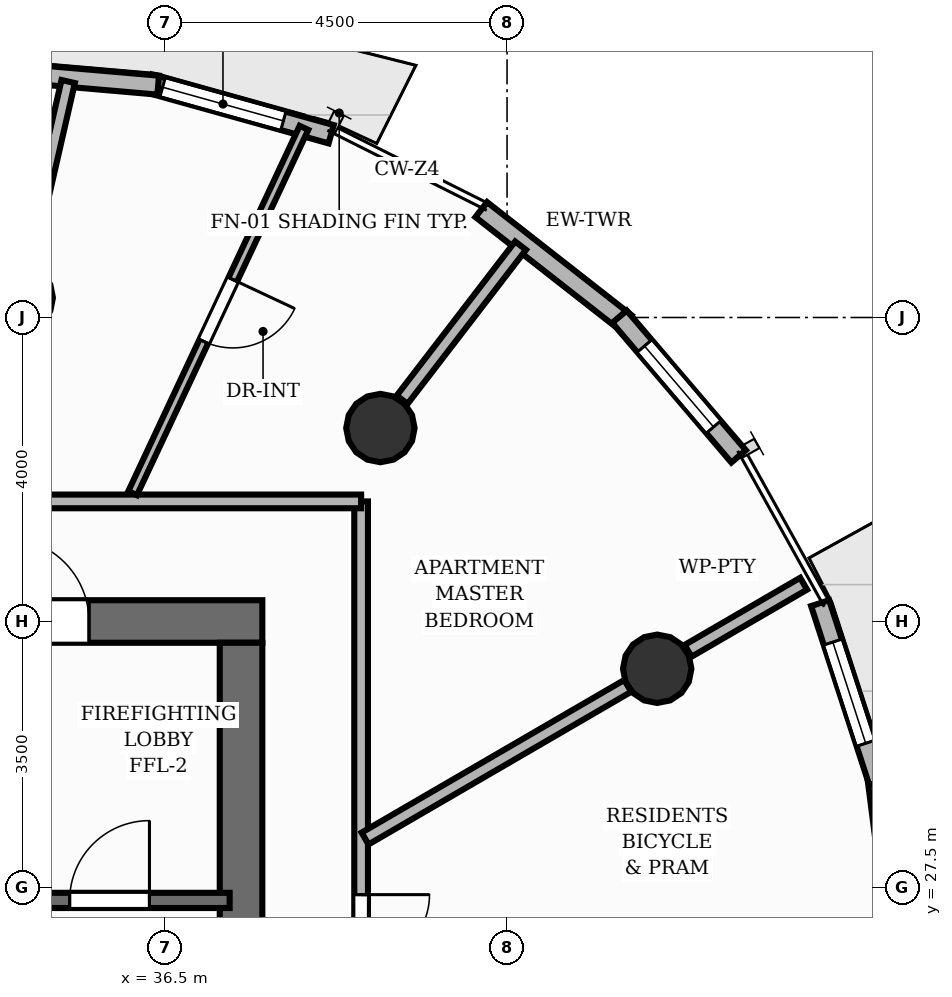
"""IFC4 building model, lengths in metres.
Left out: names, types, materials, properties, quantities, classifications, styles, units other than length and angle.
Written with IfcOpenShell. Run it as: python <this file> out.ifc"""

import sys

from ifc_helpers import new_model, si_unit, direction, frame, frame_2d, origin, origin_2d, place, context, subcontext, project, spatial, rectangle, circle, extrude, element, fill, save


model = new_model("IFC4")
c1 = context("Model", 3, precision=1e-05, world=origin(), true_north=direction((0.0, 1.0)))
c2 = subcontext(c1, "Body", "Model", "MODEL_VIEW")
j1 = project(units=[si_unit("LENGTHUNIT", "METRE"), si_unit("PLANEANGLEUNIT", "RADIAN")], contexts=[c1])
p1 = place(None, origin())
s1 = spatial("IfcSite", under=j1, at=p1, CompositionType="ELEMENT")
p2 = place(p1, origin())
s2 = spatial("IfcBuilding", under=s1, at=p2, CompositionType="ELEMENT")
p3 = place(p2, frame((0.0, 0.0, 188.64)))
s3 = spatial("IfcBuildingStorey", under=s2, at=p3, CompositionType="ELEMENT", Elevation=188.64)
p4 = place(p3, frame((26.22, 31.0, 0.0), z_axis=(0.0, 0.0, 1.0), x_axis=(1.0, 0.0, 0.0)))
e1 = element("IfcWall", 1, at=p4, inside=s3, PredefinedType="SHEAR", context=c2, shape_type="SweptSolid", body=[
    extrude(rectangle(XDim=11.56, YDim=0.56, at=frame_2d((5.78, 0.0))), origin(), (0.0, 0.0, 1.0), 3.2),
])
p5 = place(p4, frame((8.18, 0.0, 0.0)))
e2 = element("IfcOpeningElement", 2, at=p5, cuts=e1, PredefinedType="OPENING", context=c2, shape_type="SweptSolid", body=[
    extrude(rectangle(XDim=1.1, YDim=2.15, at=frame_2d((0.55, 1.075))), frame((0.0, 0.29, 0.0), z_axis=(0.0, -1.0, 0.0), x_axis=(1.0, 0.0, 0.0)), (0.0, 0.0, 1.0), 0.58),
])
p6 = place(p4, frame((0.805, 0.0, 0.0)))
e3 = element("IfcOpeningElement", 3, at=p6, cuts=e1, PredefinedType="OPENING", context=c2, shape_type="SweptSolid", body=[
    extrude(rectangle(XDim=1.05, YDim=2.15, at=frame_2d((0.525, 1.075))), frame((0.0, 0.29, 0.0), z_axis=(0.0, -1.0, 0.0), x_axis=(1.0, 0.0, 0.0)), (0.0, 0.0, 1.0), 0.58),
])
p7 = place(p4, frame((2.555, 0.0, 0.0)))
e4 = element("IfcOpeningElement", 4, at=p7, cuts=e1, PredefinedType="OPENING", context=c2, shape_type="SweptSolid", body=[
    extrude(rectangle(XDim=1.05, YDim=2.15, at=frame_2d((0.525, 1.075))), frame((0.0, 0.29, 0.0), z_axis=(0.0, -1.0, 0.0), x_axis=(1.0, 0.0, 0.0)), (0.0, 0.0, 1.0), 0.58),
])
p8 = place(p4, frame((4.305, 0.0, 0.0)))
e5 = element("IfcOpeningElement", 5, at=p8, cuts=e1, PredefinedType="OPENING", context=c2, shape_type="SweptSolid", body=[
    extrude(rectangle(XDim=1.05, YDim=2.15, at=frame_2d((0.525, 1.075))), frame((0.0, 0.29, 0.0), z_axis=(0.0, -1.0, 0.0), x_axis=(1.0, 0.0, 0.0)), (0.0, 0.0, 1.0), 0.58),
])
p9 = place(p3, frame((37.5, 17.28, 0.0), z_axis=(0.0, 0.0, 1.0), x_axis=(0.0, 1.0, 0.0)))
e6 = element("IfcWall", 6, at=p9, inside=s3, PredefinedType="SHEAR", context=c2, shape_type="SweptSolid", body=[
    extrude(rectangle(XDim=13.44, YDim=0.56, at=frame_2d((6.72, 0.0))), origin(), (0.0, 0.0, 1.0), 3.2),
])
for number, where, z_axis, x_axis in (
    (7, (42.975, 30.378, 0.0), (0.0, 0.0, 1.0), (1.0, 0.0, 0.0)),
    (8, (39.333, 33.545, 0.0), (0.0, 0.0, 1.0), (1.0, 0.0, 0.0)),
    (9, (34.575, 35.26, 0.0), (0.0, 0.0, 1.0), (1.0, 0.0, 0.0)),
):
    element("IfcColumn", number, at=place(p3, frame(where, z_axis=z_axis, x_axis=x_axis)), inside=s3, PredefinedType="COLUMN", context=c2, shape_type="SweptSolid", body=[
        extrude(circle(Radius=0.45, at=origin_2d()), origin(), (0.0, 0.0, 1.0), 3.2),
    ])
p10 = place(p3, frame((40.661, 36.42, 0.0), z_axis=(0.0, 0.0, 1.0), x_axis=(0.787404715416, -0.616436382883, 0.0)))
e10 = element("IfcWall", 10, at=p10, inside=s3, PredefinedType="SOLIDWALL", context=c2, shape_type="SweptSolid", body=[
    extrude(rectangle(XDim=2.415, YDim=0.25, at=frame_2d((1.208, 0.0))), origin(), (0.0, 0.0, 1.0), 2.96),
])
p11 = place(p3, frame((36.299, 38.077, 0.0), z_axis=(0.0, 0.0, 1.0), x_axis=(0.96316841201, -0.26889888454, 0.0)))
e11 = element("IfcWall", 11, at=p11, inside=s3, PredefinedType="SOLIDWALL", context=c2, shape_type="SweptSolid", body=[
    extrude(rectangle(XDim=2.478, YDim=0.25, at=frame_2d((1.239, 0.0))), origin(), (0.0, 0.0, 1.0), 2.96),
])
p12 = place(p11, frame((0.175, 0.0, 0.85)))
e12 = element("IfcOpeningElement", 12, at=p12, cuts=e11, PredefinedType="OPENING", context=c2, shape_type="SweptSolid", body=[
    extrude(rectangle(XDim=1.65, YDim=1.55, at=frame_2d((0.825, 0.775))), frame((0.0, 0.135, 0.0), z_axis=(0.0, -1.0, 0.0), x_axis=(1.0, 0.0, 0.0)), (0.0, 0.0, 1.0), 0.27),
])
p13 = place(p3, frame((33.888, 38.276, 0.0), z_axis=(0.0, 0.0, 1.0), x_axis=(0.996260822813, -0.08639660252, 0.0)))
e13 = element("IfcWall", 13, at=p13, inside=s3, PredefinedType="SOLIDWALL", context=c2, shape_type="SweptSolid", body=[
    extrude(rectangle(XDim=2.532, YDim=0.25, at=frame_2d((1.266, 0.0))), origin(), (0.0, 0.0, 1.0), 2.96),
])
p14 = place(p3, frame((45.86, 28.995, 0.0), z_axis=(0.0, 0.0, 1.0), x_axis=(0.128057007482, -0.991766808698, 0.0)))
e14 = element("IfcWall", 14, at=p14, inside=s3, PredefinedType="SOLIDWALL", context=c2, shape_type="SweptSolid", body=[
    extrude(rectangle(XDim=2.532, YDim=0.25, at=frame_2d((1.266, 0.0))), origin(), (0.0, 0.0, 1.0), 2.96),
])
p15 = place(p14, frame((0.441, 0.0, 0.85)))
e15 = element("IfcOpeningElement", 15, at=p15, cuts=e14, PredefinedType="OPENING", context=c2, shape_type="SweptSolid", body=[
    extrude(rectangle(XDim=1.65, YDim=1.55, at=frame_2d((0.825, 0.775))), frame((0.0, 0.135, 0.0), z_axis=(0.0, -1.0, 0.0), x_axis=(1.0, 0.0, 0.0)), (0.0, 0.0, 1.0), 0.27),
])
p16 = place(p3, frame((45.119, 31.241, 0.0), z_axis=(0.0, 0.0, 1.0), x_axis=(0.309005861828, -0.951060133407, 0.0)))
e16 = element("IfcWall", 16, at=p16, inside=s3, PredefinedType="SOLIDWALL", context=c2, shape_type="SweptSolid", body=[
    extrude(rectangle(XDim=2.478, YDim=0.25, at=frame_2d((1.239, 0.0))), origin(), (0.0, 0.0, 1.0), 2.96),
])
p17 = place(p16, frame((0.539, 0.0, 0.85)))
e17 = element("IfcOpeningElement", 17, at=p17, cuts=e16, PredefinedType="OPENING", context=c2, shape_type="SweptSolid", body=[
    extrude(rectangle(XDim=1.4, YDim=1.55, at=frame_2d((0.7, 0.775))), frame((0.0, 0.135, 0.0), z_axis=(0.0, -1.0, 0.0), x_axis=(1.0, 0.0, 0.0)), (0.0, 0.0, 1.0), 0.27),
])
p18 = place(p3, frame((42.479, 35.01, 0.0), z_axis=(0.0, 0.0, 1.0), x_axis=(0.648874307696, -0.760895612297, 0.0)))
e18 = element("IfcWall", 18, at=p18, inside=s3, PredefinedType="SOLIDWALL", context=c2, shape_type="SweptSolid", body=[
    extrude(rectangle(XDim=2.415, YDim=0.25, at=frame_2d((1.208, 0.0))), origin(), (0.0, 0.0, 1.0), 2.96),
])
p19 = place(p18, frame((0.507, 0.0, 0.85)))
e19 = element("IfcOpeningElement", 19, at=p19, cuts=e18, PredefinedType="OPENING", context=c2, shape_type="SweptSolid", body=[
    extrude(rectangle(XDim=1.4, YDim=1.55, at=frame_2d((0.7, 0.775))), frame((0.0, 0.135, 0.0), z_axis=(0.0, -1.0, 0.0), x_axis=(1.0, 0.0, 0.0)), (0.0, 0.0, 1.0), 0.27),
])
p20 = place(p3, frame((34.11, 27.33, 0.0), z_axis=(0.0, 0.0, 1.0), x_axis=(1.0, 0.0, 0.0)))
e20 = element("IfcWall", 20, at=p20, inside=s3, PredefinedType="SHEAR", context=c2, shape_type="SweptSolid", body=[
    extrude(rectangle(XDim=3.24, YDim=0.2, at=frame_2d((1.62, 0.0))), origin(), (0.0, 0.0, 1.0), 3.2),
])
p21 = place(p20, frame((1.135, 0.0, 0.0)))
e21 = element("IfcOpeningElement", 21, at=p21, cuts=e20, PredefinedType="OPENING", context=c2, shape_type="SweptSolid", body=[
    extrude(rectangle(XDim=1.05, YDim=2.15, at=frame_2d((0.525, 1.075))), frame((0.0, 0.11, 0.0), z_axis=(0.0, -1.0, 0.0), x_axis=(1.0, 0.0, 0.0)), (0.0, 0.0, 1.0), 0.22),
])
p22 = place(p3, frame((43.382, 30.614, 0.0), z_axis=(0.0, 0.0, 1.0), x_axis=(0.86461381872, 0.502437005482, 0.0)))
e22 = element("IfcWall", 22, at=p22, inside=s3, PredefinedType="PARTITIONING", context=c2, shape_type="SweptSolid", body=[
    extrude(rectangle(XDim=1.758, YDim=0.18, at=frame_2d((0.879, 0.0))), origin(), (0.0, 0.0, 1.0), 2.404),
])
p23 = place(p3, frame((39.62, 33.918, 0.0), z_axis=(0.0, 0.0, 1.0), x_axis=(0.609249164273, 0.792978849549, 0.0)))
e23 = element("IfcWall", 23, at=p23, inside=s3, PredefinedType="PARTITIONING", context=c2, shape_type="SweptSolid", body=[
    extrude(rectangle(XDim=2.557, YDim=0.18, at=frame_2d((1.278, 0.0))), origin(), (0.0, 0.0, 1.0), 2.404),
])
p24 = place(p3, frame((34.68, 35.718, 0.0), z_axis=(0.0, 0.0, 1.0), x_axis=(0.222943921747, 0.974831271429, 0.0)))
e24 = element("IfcWall", 24, at=p24, inside=s3, PredefinedType="PARTITIONING", context=c2, shape_type="SweptSolid", body=[
    extrude(rectangle(XDim=2.448, YDim=0.18, at=frame_2d((1.224, 0.0))), origin(), (0.0, 0.0, 1.0), 2.404),
])
p25 = place(p3, frame((39.08, 32.58, 0.0), z_axis=(0.0, 0.0, 1.0), x_axis=(0.0, -1.0, 0.0)))
e25 = element("IfcWall", 25, at=p25, inside=s3, PredefinedType="PARTITIONING", context=c2, shape_type="SweptSolid", body=[
    extrude(rectangle(XDim=8.094, YDim=0.18, at=frame_2d((4.047, 0.0))), origin(), (0.0, 0.0, 1.0), 2.955),
])
p26 = place(p25, frame((5.174, 0.0, 0.0)))
e26 = element("IfcOpeningElement", 26, at=p26, cuts=e25, PredefinedType="OPENING", context=c2, shape_type="SweptSolid", body=[
    extrude(rectangle(XDim=0.9, YDim=2.1, at=frame_2d((0.45, 1.05))), frame((0.0, 0.1, 0.0), z_axis=(0.0, -1.0, 0.0), x_axis=(1.0, 0.0, 0.0)), (0.0, 0.0, 1.0), 0.2),
])
p27 = place(p3, frame((24.92, 32.58, 0.0), z_axis=(0.0, 0.0, 1.0), x_axis=(1.0, 0.0, 0.0)))
e27 = element("IfcWall", 27, at=p27, inside=s3, PredefinedType="PARTITIONING", context=c2, shape_type="SweptSolid", body=[
    extrude(rectangle(XDim=14.16, YDim=0.18, at=frame_2d((7.08, 0.0))), origin(), (0.0, 0.0, 1.0), 2.955),
])
p28 = place(p27, frame((8.186, 0.0, 0.0)))
e28 = element("IfcOpeningElement", 28, at=p28, cuts=e27, PredefinedType="OPENING", context=c2, shape_type="SweptSolid", body=[
    extrude(rectangle(XDim=1.05, YDim=2.15, at=frame_2d((0.525, 1.075))), frame((0.0, 0.1, 0.0), z_axis=(0.0, -1.0, 0.0), x_axis=(1.0, 0.0, 0.0)), (0.0, 0.0, 1.0), 0.2),
])
p29 = place(p27, frame((2.119, 0.0, 0.0)))
e29 = element("IfcOpeningElement", 29, at=p29, cuts=e27, PredefinedType="OPENING", context=c2, shape_type="SweptSolid", body=[
    extrude(rectangle(XDim=0.9, YDim=2.1, at=frame_2d((0.45, 1.05))), frame((0.0, 0.1, 0.0), z_axis=(0.0, -1.0, 0.0), x_axis=(1.0, 0.0, 0.0)), (0.0, 0.0, 1.0), 0.2),
])
p30 = place(p3, frame((39.132, 28.144, 0.0), z_axis=(0.0, 0.0, 1.0), x_axis=(0.864597268714, 0.502465484319, 0.0)))
e30 = element("IfcWall", 30, at=p30, inside=s3, PredefinedType="PARTITIONING", context=c2, shape_type="SweptSolid", body=[
    extrude(rectangle(XDim=3.998, YDim=0.18, at=frame_2d((1.999, 0.0))), origin(), (0.0, 0.0, 1.0), 2.404),
])
p31 = place(p3, frame((38.328, 37.496, 0.0), z_axis=(0.0, 0.0, 1.0), x_axis=(-0.424538730781, -0.905409777983, 0.0)))
e31 = element("IfcWall", 31, at=p31, inside=s3, PredefinedType="PARTITIONING", context=c2, shape_type="SweptSolid", body=[
    extrude(rectangle(XDim=5.309, YDim=0.125, at=frame_2d((2.655, 0.0))), origin(), (0.0, 0.0, 1.0), 2.955),
])
p32 = place(p31, frame((2.205, 0.0, 0.0)))
e32 = element("IfcOpeningElement", 32, at=p32, cuts=e31, PredefinedType="OPENING", context=c2, shape_type="SweptSolid", body=[
    extrude(rectangle(XDim=0.9, YDim=2.1, at=frame_2d((0.45, 1.05))), frame((0.0, 0.073, 0.0), z_axis=(0.0, -1.0, 0.0), x_axis=(1.0, 0.0, 0.0)), (0.0, 0.0, 1.0), 0.145),
])
p33 = place(p12, origin())
e33 = element("IfcWindow", 33, at=p33, inside=s3, PartitioningType="SINGLE_PANEL", PredefinedType="WINDOW", context=c2, shape_type="SweptSolid", body=[
    extrude(rectangle(XDim=1.65, YDim=1.55, at=frame_2d((0.825, 0.775))), frame((0.0, 0.03, 0.0), z_axis=(0.0, -1.0, 0.0), x_axis=(1.0, 0.0, 0.0)), (0.0, 0.0, 1.0), 0.06),
])
fill(e12, e33)
p34 = place(p17, origin())
e34 = element("IfcWindow", 34, at=p34, inside=s3, PartitioningType="SINGLE_PANEL", PredefinedType="WINDOW", context=c2, shape_type="SweptSolid", body=[
    extrude(rectangle(XDim=1.4, YDim=1.55, at=frame_2d((0.7, 0.775))), frame((0.0, 0.03, 0.0), z_axis=(0.0, -1.0, 0.0), x_axis=(1.0, 0.0, 0.0)), (0.0, 0.0, 1.0), 0.06),
])
fill(e17, e34)
p35 = place(p19, origin())
e35 = element("IfcWindow", 35, at=p35, inside=s3, PartitioningType="SINGLE_PANEL", PredefinedType="WINDOW", context=c2, shape_type="SweptSolid", body=[
    extrude(rectangle(XDim=1.4, YDim=1.55, at=frame_2d((0.7, 0.775))), frame((0.0, 0.03, 0.0), z_axis=(0.0, -1.0, 0.0), x_axis=(1.0, 0.0, 0.0)), (0.0, 0.0, 1.0), 0.06),
])
fill(e19, e35)
p36 = place(p21, origin())
e36 = element("IfcDoor", 36, at=p36, inside=s3, OperationType="SINGLE_SWING_RIGHT", PredefinedType="DOOR", context=c2, shape_type="SweptSolid", body=[
    extrude(rectangle(XDim=1.05, YDim=2.15, at=frame_2d((0.525, 1.075))), frame((0.0, 0.025, 0.0), z_axis=(0.0, -1.0, 0.0), x_axis=(1.0, 0.0, 0.0)), (0.0, 0.0, 1.0), 0.05),
])
fill(e21, e36)
p37 = place(p5, origin())
e37 = element("IfcDoor", 37, at=p37, inside=s3, OperationType="SINGLE_SWING_LEFT", PredefinedType="DOOR", context=c2, shape_type="SweptSolid", body=[
    extrude(rectangle(XDim=1.1, YDim=2.15, at=frame_2d((0.55, 1.075))), frame((0.0, 0.025, 0.0), z_axis=(0.0, -1.0, 0.0), x_axis=(1.0, 0.0, 0.0)), (0.0, 0.0, 1.0), 0.05),
])
fill(e2, e37)
p38 = place(p26, origin())
e38 = element("IfcDoor", 38, at=p38, inside=s3, OperationType="SINGLE_SWING_LEFT", PredefinedType="DOOR", context=c2, shape_type="SweptSolid", body=[
    extrude(rectangle(XDim=0.9, YDim=2.1, at=frame_2d((0.45, 1.05))), frame((0.0, 0.025, 0.0), z_axis=(0.0, -1.0, 0.0), x_axis=(1.0, 0.0, 0.0)), (0.0, 0.0, 1.0), 0.05),
])
fill(e26, e38)
p39 = place(p32, origin())
e39 = element("IfcDoor", 39, at=p39, inside=s3, OperationType="SINGLE_SWING_LEFT", PredefinedType="DOOR", context=c2, shape_type="SweptSolid", body=[
    extrude(rectangle(XDim=0.9, YDim=2.1, at=frame_2d((0.45, 1.05))), frame((0.0, 0.025, 0.0), z_axis=(0.0, -1.0, 0.0), x_axis=(1.0, 0.0, 0.0)), (0.0, 0.0, 1.0), 0.05),
])
fill(e32, e39)
save(model, sys.argv[1])
